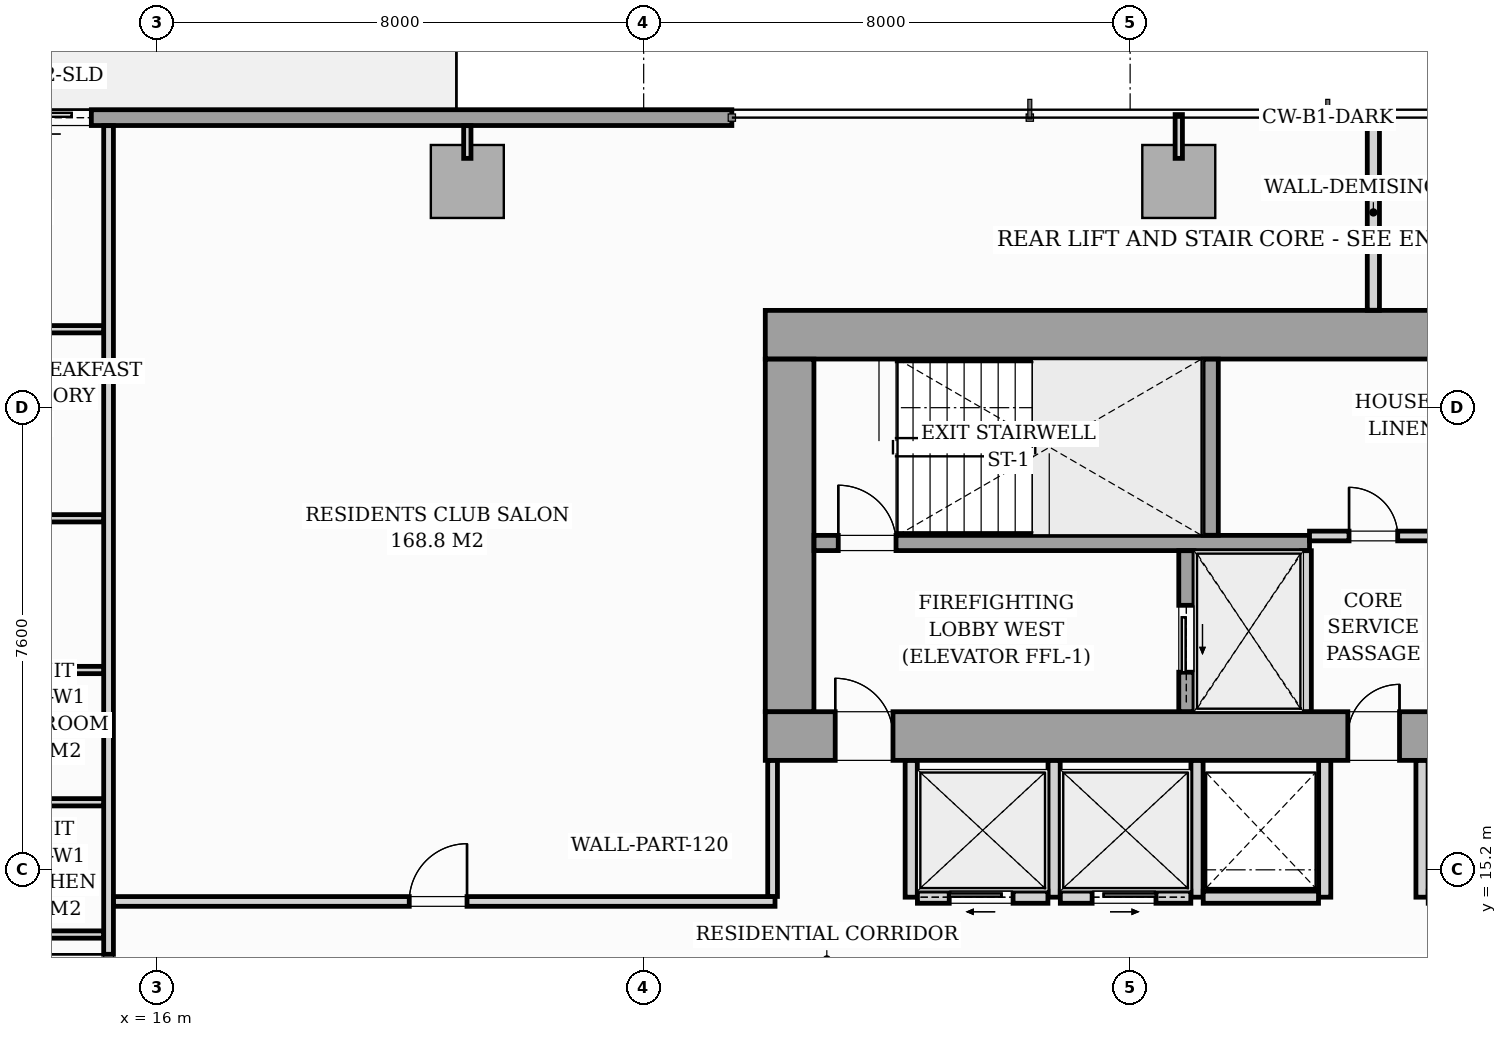
"""IFC4 building model, lengths in metres.
Left out: names, types, materials, properties, quantities, classifications, styles, units other than length and angle.
Written with IfcOpenShell. Run it as: python <this file> out.ifc"""

import sys

from ifc_helpers import new_model, si_unit, direction, frame, frame_2d, origin, origin_2d, place, context, subcontext, project, spatial, rectangle, i_section, extrude, source, transform, mapped, element, fill, save


model = new_model("IFC4")
c1 = context("Model", 3, precision=1e-05, world=origin(), true_north=direction((0.0, 1.0)))
c2 = subcontext(c1, "Body", "Model", "MODEL_VIEW")
j1 = project(units=[si_unit("LENGTHUNIT", "METRE"), si_unit("PLANEANGLEUNIT", "RADIAN")], contexts=[c1])
p1 = place(None, origin())
s1 = spatial("IfcSite", under=j1, at=p1, CompositionType="ELEMENT")
p2 = place(p1, origin())
s2 = spatial("IfcBuilding", under=s1, at=p2, CompositionType="ELEMENT")
p3 = place(p2, frame((0.0, 0.0, 26.2)))
s3 = spatial("IfcBuildingStorey", under=s2, at=p3, CompositionType="ELEMENT", Elevation=26.2)
m1 = source(origin(), c2, "Body", "SweptSolid", [
    extrude(i_section(OverallWidth=0.437, OverallDepth=0.514, WebThickness=0.061, FlangeThickness=0.097, FilletRadius=0.018, at=origin_2d()), origin(), (0.0, 0.0, 1.0), 3.196),
])
for number, where, z_axis, x_axis in (
    (1, (26.4, 17.4, 0.002), (0.0, 0.0, 1.0), (1.0, 0.0, 0.0)),
    (2, (33.12, 17.4, 0.002), (0.0, 0.0, 1.0), (1.0, 0.0, 0.0)),
    (3, (26.4, 24.0, 0.002), (0.0, 0.0, 1.0), (1.0, 0.0, 0.0)),
    (4, (33.12, 24.0, 0.002), (0.0, 0.0, 1.0), (1.0, 0.0, 0.0)),
):
    element("IfcColumn", number, at=place(p3, frame(where, z_axis=z_axis, x_axis=x_axis)), inside=s3, PredefinedType="PILASTER", context=c2, shape_type="MappedRepresentation", body=[
        mapped(m1, transform((0.0, 0.0, 0.0), scale=1.0)),
    ])
m2 = source(origin(), c2, "Body", "SweptSolid", [
    extrude(rectangle(XDim=1.2, YDim=1.2, at=origin_2d()), origin(), (0.0, 0.0, 1.0), 3.196),
])
for number, where, z_axis, x_axis in (
    (5, (21.1, 26.52, 0.002), (0.0, 0.0, 1.0), (1.0, 0.0, 0.0)),
    (6, (32.8, 26.52, 0.002), (0.0, 0.0, 1.0), (1.0, 0.0, 0.0)),
):
    element("IfcColumn", number, at=place(p3, frame(where, z_axis=z_axis, x_axis=x_axis)), inside=s3, PredefinedType="COLUMN", context=c2, shape_type="MappedRepresentation", body=[
        mapped(m2, transform((0.0, 0.0, 0.0), scale=1.0)),
    ])
p4 = place(p3, frame((8.3, 27.57, 0.0), z_axis=(0.0, 0.0, 1.0), x_axis=(1.0, 0.0, 0.0)))
e7 = element("IfcWall", 7, at=p4, inside=s3, PredefinedType="STANDARD", context=c2, shape_type="SweptSolid", body=[
    extrude(rectangle(XDim=17.15, YDim=0.26, at=frame_2d((8.575, 0.0))), origin(), (0.0, 0.0, 1.0), 2.94),
])
p5 = place(p4, frame((4.817, 0.0, 0.0)))
e8 = element("IfcOpeningElement", 8, at=p5, cuts=e7, PredefinedType="OPENING", context=c2, shape_type="SweptSolid", body=[
    extrude(rectangle(XDim=1.8, YDim=2.06, at=frame_2d((0.9, 1.03))), frame((0.0, 0.14, 0.0), z_axis=(0.0, -1.0, 0.0), x_axis=(1.0, 0.0, 0.0)), (0.0, 0.0, 1.0), 0.28),
])
p6 = place(p4, frame((2.05, 0.0, 0.65)))
e9 = element("IfcOpeningElement", 9, at=p6, cuts=e7, PredefinedType="OPENING", context=c2, shape_type="SweptSolid", body=[
    extrude(rectangle(XDim=1.6, YDim=1.5, at=frame_2d((0.8, 0.75))), frame((0.0, 0.14, 0.0), z_axis=(0.0, -1.0, 0.0), x_axis=(1.0, 0.0, 0.0)), (0.0, 0.0, 1.0), 0.28),
])
p7 = place(p3, frame((26.0, 17.4, 0.0), z_axis=(0.0, 0.0, 1.0), x_axis=(1.0, 0.0, 0.0)))
e10 = element("IfcWall", 10, at=p7, inside=s3, PredefinedType="SHEAR", context=c2, shape_type="SweptSolid", body=[
    extrude(rectangle(XDim=20.0, YDim=0.8, at=frame_2d((10.0, 0.0))), origin(), (0.0, 0.0, 1.0), 3.2),
])
p8 = place(p7, frame((1.15, 0.0, 0.0)))
e11 = element("IfcOpeningElement", 11, at=p8, cuts=e10, PredefinedType="OPENING", context=c2, shape_type="SweptSolid", body=[
    extrude(rectangle(XDim=0.95, YDim=2.06, at=frame_2d((0.475, 1.03))), frame((0.0, 0.41, 0.0), z_axis=(0.0, -1.0, 0.0), x_axis=(1.0, 0.0, 0.0)), (0.0, 0.0, 1.0), 0.82),
])
p9 = place(p7, frame((9.58, 0.0, 0.0)))
e12 = element("IfcOpeningElement", 12, at=p9, cuts=e10, PredefinedType="OPENING", context=c2, shape_type="SweptSolid", body=[
    extrude(rectangle(XDim=0.85, YDim=2.0, at=frame_2d((0.425, 1.0))), frame((0.0, 0.41, 0.0), z_axis=(0.0, -1.0, 0.0), x_axis=(1.0, 0.0, 0.0)), (0.0, 0.0, 1.0), 0.82),
])
p10 = place(p7, frame((17.75, 0.0, 0.0)))
e13 = element("IfcOpeningElement", 13, at=p10, cuts=e10, PredefinedType="OPENING", context=c2, shape_type="SweptSolid", body=[
    extrude(rectangle(XDim=0.95, YDim=2.06, at=frame_2d((0.475, 1.03))), frame((0.0, 0.41, 0.0), z_axis=(0.0, -1.0, 0.0), x_axis=(1.0, 0.0, 0.0)), (0.0, 0.0, 1.0), 0.82),
])
p11 = place(p3, frame((26.0, 24.0, 0.0), z_axis=(0.0, 0.0, 1.0), x_axis=(1.0, 0.0, 0.0)))
e14 = element("IfcWall", 14, at=p11, inside=s3, PredefinedType="SHEAR", context=c2, shape_type="SweptSolid", body=[
    extrude(rectangle(XDim=20.0, YDim=0.8, at=frame_2d((10.0, 0.0))), origin(), (0.0, 0.0, 1.0), 3.2),
])
p12 = place(p3, frame((26.4, 17.802, 0.0), z_axis=(0.0, 0.0, 1.0), x_axis=(0.0, 1.0, 0.0)))
e15 = element("IfcWall", 15, at=p12, inside=s3, PredefinedType="SHEAR", context=c2, shape_type="SweptSolid", body=[
    extrude(rectangle(XDim=5.796, YDim=0.8, at=frame_2d((2.898, 0.0))), origin(), (0.0, 0.0, 1.0), 3.2),
])
p13 = place(p3, frame((26.802, 20.575, 0.0), z_axis=(0.0, 0.0, 1.0), x_axis=(1.0, 0.0, 0.0)))
e16 = element("IfcWall", 16, at=p13, inside=s3, PredefinedType="SOLIDWALL", context=c2, shape_type="SweptSolid", body=[
    extrude(rectangle(XDim=8.148, YDim=0.25, at=frame_2d((4.074, 0.0))), origin(), (0.0, 0.0, 1.0), 3.2),
])
p14 = place(p13, frame((0.398, 0.0, 0.0)))
e17 = element("IfcOpeningElement", 17, at=p14, cuts=e16, PredefinedType="OPENING", context=c2, shape_type="SweptSolid", body=[
    extrude(rectangle(XDim=0.95, YDim=2.06, at=frame_2d((0.475, 1.03))), frame((0.0, 0.135, 0.0), z_axis=(0.0, -1.0, 0.0), x_axis=(1.0, 0.0, 0.0)), (0.0, 0.0, 1.0), 0.27),
])
p15 = place(p3, frame((33.325, 20.702, 0.0), z_axis=(0.0, 0.0, 1.0), x_axis=(0.0, 1.0, 0.0)))
e18 = element("IfcWall", 18, at=p15, inside=s3, PredefinedType="SOLIDWALL", context=c2, shape_type="SweptSolid", body=[
    extrude(rectangle(XDim=2.896, YDim=0.25, at=frame_2d((1.448, 0.0))), origin(), (0.0, 0.0, 1.0), 3.2),
])
p16 = place(p3, frame((32.925, 17.802, 0.0), z_axis=(0.0, 0.0, 1.0), x_axis=(0.0, 1.0, 0.0)))
e19 = element("IfcWall", 19, at=p16, inside=s3, PredefinedType="SOLIDWALL", context=c2, shape_type="SweptSolid", body=[
    extrude(rectangle(XDim=2.646, YDim=0.25, at=frame_2d((1.323, 0.0))), origin(), (0.0, 0.0, 1.0), 3.2),
])
p17 = place(p16, frame((0.648, 0.0, 0.0)))
e20 = element("IfcOpeningElement", 20, at=p17, cuts=e19, PredefinedType="OPENING", context=c2, shape_type="SweptSolid", body=[
    extrude(rectangle(XDim=1.1, YDim=2.08, at=frame_2d((0.55, 1.04))), frame((0.0, 0.135, 0.0), z_axis=(0.0, -1.0, 0.0), x_axis=(1.0, 0.0, 0.0)), (0.0, 0.0, 1.0), 0.27),
])
p18 = place(p3, frame((34.9, 17.802, 0.0), z_axis=(0.0, 0.0, 1.0), x_axis=(0.0, 1.0, 0.0)))
e21 = element("IfcWall", 21, at=p18, inside=s3, PredefinedType="PARTITIONING", context=c2, shape_type="SweptSolid", body=[
    extrude(rectangle(XDim=2.646, YDim=0.16, at=frame_2d((1.323, 0.0))), origin(), (0.0, 0.0, 1.0), 2.94),
])
p19 = place(p3, frame((34.95, 20.69, 0.0), z_axis=(0.0, 0.0, 1.0), x_axis=(1.0, 0.0, 0.0)))
e22 = element("IfcWall", 22, at=p19, inside=s3, PredefinedType="PARTITIONING", context=c2, shape_type="SweptSolid", body=[
    extrude(rectangle(XDim=2.1, YDim=0.16, at=frame_2d((1.05, 0.0))), origin(), (0.0, 0.0, 1.0), 2.94),
])
p20 = place(p19, frame((0.65, 0.0, 0.0)))
e23 = element("IfcOpeningElement", 23, at=p20, cuts=e22, PredefinedType="OPENING", context=c2, shape_type="SweptSolid", body=[
    extrude(rectangle(XDim=0.8, YDim=2.05, at=frame_2d((0.4, 1.025))), frame((0.0, 0.09, 0.0), z_axis=(0.0, -1.0, 0.0), x_axis=(1.0, 0.0, 0.0)), (0.0, 0.0, 1.0), 0.18),
])
for number, where, z_axis, x_axis in (
    (24, (28.4, 14.75, 0.0), (0.0, 0.0, 1.0), (0.0, 1.0, 0.0)),
    (25, (30.75, 14.75, 0.0), (0.0, 0.0, 1.0), (0.0, 1.0, 0.0)),
    (26, (33.1, 14.75, 0.0), (0.0, 0.0, 1.0), (0.0, 1.0, 0.0)),
):
    element("IfcWall", number, at=place(p3, frame(where, z_axis=z_axis, x_axis=x_axis)), inside=s3, PredefinedType="PARTITIONING", context=c2, shape_type="SweptSolid", body=[
        extrude(rectangle(XDim=2.248, YDim=0.2, at=frame_2d((1.124, 0.0))), origin(), (0.0, 0.0, 1.0), 2.94),
    ])
p21 = place(p3, frame((28.502, 14.75, 0.0), z_axis=(0.0, 0.0, 1.0), x_axis=(1.0, 0.0, 0.0)))
e27 = element("IfcWall", 27, at=p21, inside=s3, PredefinedType="PARTITIONING", context=c2, shape_type="SweptSolid", body=[
    extrude(rectangle(XDim=2.146, YDim=0.2, at=frame_2d((1.073, 0.0))), origin(), (0.0, 0.0, 1.0), 2.94),
])
p22 = place(p21, frame((0.523, 0.0, 0.0)))
e28 = element("IfcOpeningElement", 28, at=p22, cuts=e27, PredefinedType="OPENING", context=c2, shape_type="SweptSolid", body=[
    extrude(rectangle(XDim=1.05, YDim=2.08, at=frame_2d((0.525, 1.04))), frame((0.0, 0.11, 0.0), z_axis=(0.0, -1.0, 0.0), x_axis=(1.0, 0.0, 0.0)), (0.0, 0.0, 1.0), 0.22),
])
p23 = place(p3, frame((30.852, 14.75, 0.0), z_axis=(0.0, 0.0, 1.0), x_axis=(1.0, 0.0, 0.0)))
e29 = element("IfcWall", 29, at=p23, inside=s3, PredefinedType="PARTITIONING", context=c2, shape_type="SweptSolid", body=[
    extrude(rectangle(XDim=2.146, YDim=0.2, at=frame_2d((1.073, 0.0))), origin(), (0.0, 0.0, 1.0), 2.94),
])
p24 = place(p23, frame((0.523, 0.0, 0.0)))
e30 = element("IfcOpeningElement", 30, at=p24, cuts=e29, PredefinedType="OPENING", context=c2, shape_type="SweptSolid", body=[
    extrude(rectangle(XDim=1.05, YDim=2.08, at=frame_2d((0.525, 1.04))), frame((0.0, 0.11, 0.0), z_axis=(0.0, -1.0, 0.0), x_axis=(1.0, 0.0, 0.0)), (0.0, 0.0, 1.0), 0.22),
])
p25 = place(p3, frame((35.2, 14.75, 0.0), z_axis=(0.0, 0.0, 1.0), x_axis=(0.0, 1.0, 0.0)))
e31 = element("IfcWall", 31, at=p25, inside=s3, PredefinedType="PARTITIONING", context=c2, shape_type="SweptSolid", body=[
    extrude(rectangle(XDim=2.248, YDim=0.2, at=frame_2d((1.124, 0.0))), origin(), (0.0, 0.0, 1.0), 2.94),
])
p26 = place(p3, frame((33.202, 14.75, 0.0), z_axis=(0.0, 0.0, 1.0), x_axis=(1.0, 0.0, 0.0)))
e32 = element("IfcWall", 32, at=p26, inside=s3, PredefinedType="PARTITIONING", context=c2, shape_type="SweptSolid", body=[
    extrude(rectangle(XDim=1.896, YDim=0.2, at=frame_2d((0.948, 0.0))), origin(), (0.0, 0.0, 1.0), 2.94),
])
p27 = place(p3, frame((36.8, 14.75, 0.0), z_axis=(0.0, 0.0, 1.0), x_axis=(0.0, 1.0, 0.0)))
e33 = element("IfcWall", 33, at=p27, inside=s3, PredefinedType="PARTITIONING", context=c2, shape_type="SweptSolid", body=[
    extrude(rectangle(XDim=2.248, YDim=0.2, at=frame_2d((1.124, 0.0))), origin(), (0.0, 0.0, 1.0), 2.94),
])
p28 = place(p3, frame((15.2, 12.432, 0.0), z_axis=(0.0, 0.0, 1.0), x_axis=(0.0, 1.0, 0.0)))
e34 = element("IfcWall", 34, at=p28, inside=s3, PredefinedType="PARTITIONING", context=c2, shape_type="SweptSolid", body=[
    extrude(rectangle(XDim=15.006, YDim=0.16, at=frame_2d((7.503, 0.0))), origin(), (0.0, 0.0, 1.0), 2.94),
])
p29 = place(p28, frame((0.429, 0.0, 0.0)))
e35 = element("IfcOpeningElement", 35, at=p29, cuts=e34, PredefinedType="OPENING", context=c2, shape_type="SweptSolid", body=[
    extrude(rectangle(XDim=0.95, YDim=2.06, at=frame_2d((0.475, 1.03))), frame((0.0, 0.09, 0.0), z_axis=(0.0, -1.0, 0.0), x_axis=(1.0, 0.0, 0.0)), (0.0, 0.0, 1.0), 0.18),
])
p30 = place(p3, frame((36.0, 24.402, 0.0), z_axis=(0.0, 0.0, 1.0), x_axis=(0.0, 1.0, 0.0)))
e36 = element("IfcWall", 36, at=p30, inside=s3, PredefinedType="PARTITIONING", context=c2, shape_type="SweptSolid", body=[
    extrude(rectangle(XDim=3.218, YDim=0.2, at=frame_2d((1.609, 0.0))), origin(), (0.0, 0.0, 1.0), 2.94),
])
p31 = place(p3, frame((12.862, 16.311, 0.0), z_axis=(0.0, 0.0, 1.0), x_axis=(1.0, 0.0, 0.0)))
e37 = element("IfcWall", 37, at=p31, inside=s3, PredefinedType="PARTITIONING", context=c2, shape_type="SweptSolid", body=[
    extrude(rectangle(XDim=2.256, YDim=0.12, at=frame_2d((1.128, 0.0))), origin(), (0.0, 0.0, 1.0), 2.045),
])
for number, where, z_axis, x_axis in (
    (38, (12.862, 14.136, 0.0), (0.0, 0.0, 1.0), (1.0, 0.0, 0.0)),
    (39, (12.862, 18.486, 0.0), (0.0, 0.0, 1.0), (1.0, 0.0, 0.0)),
):
    element("IfcWall", number, at=place(p3, frame(where, z_axis=z_axis, x_axis=x_axis)), inside=s3, PredefinedType="PARTITIONING", context=c2, shape_type="SweptSolid", body=[
        extrude(rectangle(XDim=2.256, YDim=0.12, at=frame_2d((1.128, 0.0))), origin(), (0.0, 0.0, 1.0), 2.94),
    ])
p32 = place(p3, frame((5.88, 24.09, 0.0), z_axis=(0.0, 0.0, 1.0), x_axis=(1.0, 0.0, 0.0)))
e40 = element("IfcWall", 40, at=p32, inside=s3, PredefinedType="PARTITIONING", context=c2, shape_type="SweptSolid", body=[
    extrude(rectangle(XDim=9.238, YDim=0.12, at=frame_2d((4.619, 0.0))), origin(), (0.0, 0.0, 1.0), 2.94),
])
p33 = place(p32, frame((4.185, 0.0, 0.0)))
e41 = element("IfcOpeningElement", 41, at=p33, cuts=e40, PredefinedType="OPENING", context=c2, shape_type="SweptSolid", body=[
    extrude(rectangle(XDim=0.85, YDim=2.05, at=frame_2d((0.425, 1.025))), frame((0.0, 0.07, 0.0), z_axis=(0.0, -1.0, 0.0), x_axis=(1.0, 0.0, 0.0)), (0.0, 0.0, 1.0), 0.14),
])
p34 = place(p3, frame((5.88, 20.981, 0.0), z_axis=(0.0, 0.0, 1.0), x_axis=(1.0, 0.0, 0.0)))
e42 = element("IfcWall", 42, at=p34, inside=s3, PredefinedType="PARTITIONING", context=c2, shape_type="SweptSolid", body=[
    extrude(rectangle(XDim=9.238, YDim=0.12, at=frame_2d((4.619, 0.0))), origin(), (0.0, 0.0, 1.0), 2.94),
])
p35 = place(p34, frame((4.185, 0.0, 0.0)))
e43 = element("IfcOpeningElement", 43, at=p35, cuts=e42, PredefinedType="OPENING", context=c2, shape_type="SweptSolid", body=[
    extrude(rectangle(XDim=0.85, YDim=2.05, at=frame_2d((0.425, 1.025))), frame((0.0, 0.07, 0.0), z_axis=(0.0, -1.0, 0.0), x_axis=(1.0, 0.0, 0.0)), (0.0, 0.0, 1.0), 0.14),
])
p36 = place(p3, frame((15.282, 14.68, 0.0), z_axis=(0.0, 0.0, 1.0), x_axis=(1.0, 0.0, 0.0)))
e44 = element("IfcWall", 44, at=p36, inside=s3, PredefinedType="PARTITIONING", context=c2, shape_type="SweptSolid", body=[
    extrude(rectangle(XDim=10.878, YDim=0.16, at=frame_2d((5.439, 0.0))), origin(), (0.0, 0.0, 1.0), 2.94),
])
p37 = place(p36, frame((4.863, 0.0, 0.0)))
e45 = element("IfcOpeningElement", 45, at=p37, cuts=e44, PredefinedType="OPENING", context=c2, shape_type="SweptSolid", body=[
    extrude(rectangle(XDim=0.95, YDim=2.06, at=frame_2d((0.475, 1.03))), frame((0.0, 0.09, 0.0), z_axis=(0.0, -1.0, 0.0), x_axis=(1.0, 0.0, 0.0)), (0.0, 0.0, 1.0), 0.18),
])
p38 = place(p3, frame((26.12, 14.762, 0.0), z_axis=(0.0, 0.0, 1.0), x_axis=(0.0, 1.0, 0.0)))
e46 = element("IfcWall", 46, at=p38, inside=s3, PredefinedType="PARTITIONING", context=c2, shape_type="SweptSolid", body=[
    extrude(rectangle(XDim=2.236, YDim=0.16, at=frame_2d((1.118, 0.0))), origin(), (0.0, 0.0, 1.0), 2.94),
])
p39 = place(p3, frame((21.1, 26.9, 0.0), z_axis=(0.0, 0.0, 1.0), x_axis=(0.0, 1.0, 0.0)))
e47 = element("IfcWall", 47, at=p39, inside=s3, PredefinedType="PARTITIONING", context=c2, shape_type="SweptSolid", body=[
    extrude(rectangle(XDim=0.538, YDim=0.12, at=frame_2d((0.269, 0.0))), origin(), (0.0, 0.0, 1.0), 2.94),
])
p40 = place(p3, frame((32.8, 26.9, 0.0), z_axis=(0.0, 0.0, 1.0), x_axis=(0.0, 1.0, 0.0)))
e48 = element("IfcWall", 48, at=p40, inside=s3, PredefinedType="PARTITIONING", context=c2, shape_type="SweptSolid", body=[
    extrude(rectangle(XDim=0.72, YDim=0.12, at=frame_2d((0.36, 0.0))), origin(), (0.0, 0.0, 1.0), 2.94),
])
m3 = source(origin(), c2, "Body", "SweptSolid", [
    extrude(rectangle(XDim=1.8, YDim=2.06, at=frame_2d((0.9, 1.03))), frame((0.0, 0.025, 0.0), z_axis=(0.0, -1.0, 0.0), x_axis=(1.0, 0.0, 0.0)), (0.0, 0.0, 1.0), 0.05),
])
p41 = place(p5, origin())
e49 = element("IfcDoor", 49, at=p41, inside=s3, OperationType="SLIDING_TO_LEFT", PredefinedType="DOOR", context=c2, shape_type="MappedRepresentation", body=[
    mapped(m3, transform((0.0, 0.0, 0.0), scale=1.0)),
])
fill(e8, e49)
m4 = source(origin(), c2, "Body", "SweptSolid", [
    extrude(rectangle(XDim=0.95, YDim=2.06, at=frame_2d((0.475, 1.03))), frame((0.0, 0.025, 0.0), z_axis=(0.0, -1.0, 0.0), x_axis=(1.0, 0.0, 0.0)), (0.0, 0.0, 1.0), 0.05),
])
p42 = place(p8, origin())
e50 = element("IfcDoor", 50, at=p42, inside=s3, OperationType="SINGLE_SWING_LEFT", PredefinedType="DOOR", context=c2, shape_type="MappedRepresentation", body=[
    mapped(m4, transform((0.0, 0.0, 0.0), scale=1.0)),
])
fill(e11, e50)
m5 = source(origin(), c2, "Body", "SweptSolid", [
    extrude(rectangle(XDim=0.85, YDim=2.0, at=frame_2d((0.425, 1.0))), frame((0.0, 0.025, 0.0), z_axis=(0.0, -1.0, 0.0), x_axis=(1.0, 0.0, 0.0)), (0.0, 0.0, 1.0), 0.05),
])
p43 = place(p9, origin())
e51 = element("IfcDoor", 51, at=p43, inside=s3, OperationType="SINGLE_SWING_RIGHT", PredefinedType="DOOR", context=c2, shape_type="MappedRepresentation", body=[
    mapped(m5, transform((0.0, 0.0, 0.0), scale=1.0)),
])
fill(e12, e51)
p44 = place(p14, origin())
e52 = element("IfcDoor", 52, at=p44, inside=s3, OperationType="SINGLE_SWING_LEFT", PredefinedType="DOOR", context=c2, shape_type="MappedRepresentation", body=[
    mapped(m4, transform((0.0, 0.0, 0.0), scale=1.0)),
])
fill(e17, e52)
m6 = source(origin(), c2, "Body", "SweptSolid", [
    extrude(rectangle(XDim=1.1, YDim=2.08, at=frame_2d((0.55, 1.04))), frame((0.0, 0.025, 0.0), z_axis=(0.0, -1.0, 0.0), x_axis=(1.0, 0.0, 0.0)), (0.0, 0.0, 1.0), 0.05),
])
p45 = place(p17, origin())
e53 = element("IfcDoor", 53, at=p45, inside=s3, OperationType="SLIDING_TO_LEFT", PredefinedType="DOOR", context=c2, shape_type="MappedRepresentation", body=[
    mapped(m6, transform((0.0, 0.0, 0.0), scale=1.0)),
])
fill(e20, e53)
m7 = source(origin(), c2, "Body", "SweptSolid", [
    extrude(rectangle(XDim=0.8, YDim=2.05, at=frame_2d((0.4, 1.025))), frame((0.0, 0.025, 0.0), z_axis=(0.0, -1.0, 0.0), x_axis=(1.0, 0.0, 0.0)), (0.0, 0.0, 1.0), 0.05),
])
p46 = place(p20, origin())
e54 = element("IfcDoor", 54, at=p46, inside=s3, OperationType="SINGLE_SWING_LEFT", PredefinedType="DOOR", context=c2, shape_type="MappedRepresentation", body=[
    mapped(m7, transform((0.0, 0.0, 0.0), scale=1.0)),
])
fill(e23, e54)
m8 = source(origin(), c2, "Body", "SweptSolid", [
    extrude(rectangle(XDim=1.05, YDim=2.08, at=frame_2d((0.525, 1.04))), frame((0.0, 0.025, 0.0), z_axis=(0.0, -1.0, 0.0), x_axis=(1.0, 0.0, 0.0)), (0.0, 0.0, 1.0), 0.05),
])
p47 = place(p22, origin())
e55 = element("IfcDoor", 55, at=p47, inside=s3, OperationType="SLIDING_TO_LEFT", PredefinedType="DOOR", context=c2, shape_type="MappedRepresentation", body=[
    mapped(m8, transform((0.0, 0.0, 0.0), scale=1.0)),
])
fill(e28, e55)
p48 = place(p24, origin())
e56 = element("IfcDoor", 56, at=p48, inside=s3, OperationType="SLIDING_TO_RIGHT", PredefinedType="DOOR", context=c2, shape_type="MappedRepresentation", body=[
    mapped(m8, transform((0.0, 0.0, 0.0), scale=1.0)),
])
fill(e30, e56)
m9 = source(origin(), c2, "Body", "SweptSolid", [
    extrude(rectangle(XDim=0.95, YDim=2.06, at=frame_2d((0.475, 1.03))), frame((0.0, 0.025, 0.0), z_axis=(0.0, -1.0, 0.0), x_axis=(1.0, 0.0, 0.0)), (0.0, 0.0, 1.0), 0.05),
])
p49 = place(p29, origin())
e57 = element("IfcDoor", 57, at=p49, inside=s3, OperationType="SINGLE_SWING_RIGHT", PredefinedType="DOOR", context=c2, shape_type="MappedRepresentation", body=[
    mapped(m9, transform((0.0, 0.0, 0.0), scale=1.0)),
])
fill(e35, e57)
p50 = place(p37, origin())
e58 = element("IfcDoor", 58, at=p50, inside=s3, OperationType="SINGLE_SWING_RIGHT", PredefinedType="DOOR", context=c2, shape_type="MappedRepresentation", body=[
    mapped(m9, transform((0.0, 0.0, 0.0), scale=1.0)),
])
fill(e45, e58)
save(model, sys.argv[1])
